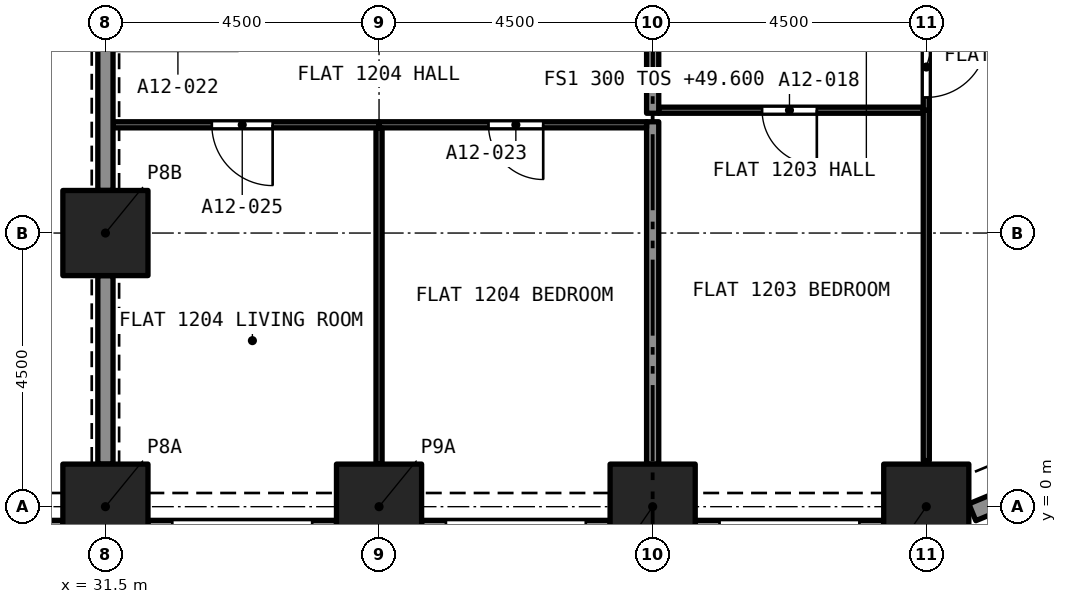
"""IFC4 building model, lengths in metres.
Left out: names, types, materials, properties, quantities, classifications, styles, units other than length and angle.
Written with IfcOpenShell. Run it as: python <this file> out.ifc"""

import sys

from ifc_helpers import new_model, si_unit, direction, frame, frame_2d, origin, origin_2d, place, context, subcontext, project, spatial, rectangle, extrude, element, fill, save


model = new_model("IFC4")
c1 = context("Model", 3, precision=1e-05, world=origin(), true_north=direction((0.0, 1.0)))
c2 = subcontext(c1, "Body", "Model", "MODEL_VIEW")
j1 = project(units=[si_unit("LENGTHUNIT", "METRE"), si_unit("PLANEANGLEUNIT", "RADIAN")], contexts=[c1])
p1 = place(None, origin())
s1 = spatial("IfcSite", under=j1, at=p1, CompositionType="ELEMENT")
p2 = place(p1, origin())
s2 = spatial("IfcBuilding", under=s1, at=p2, CompositionType="ELEMENT")
p3 = place(p2, frame((0.0, 0.0, 49.6)))
s3 = spatial("IfcBuildingStorey", under=s2, at=p3, CompositionType="ELEMENT", Elevation=49.6)
for number, where, z_axis, x_axis in (
    (1, (31.5, 0.0, 0.0), (0.0, 0.0, 1.0), (1.0, 0.0, 0.0)),
    (2, (36.0, 0.0, 0.0), (0.0, 0.0, 1.0), (1.0, 0.0, 0.0)),
    (3, (40.5, 0.0, 0.0), (0.0, 0.0, 1.0), (1.0, 0.0, 0.0)),
    (4, (45.0, 0.0, 0.0), (0.0, 0.0, 1.0), (1.0, 0.0, 0.0)),
    (5, (31.5, 4.5, 0.0), (0.0, 0.0, 1.0), (1.0, 0.0, 0.0)),
):
    element("IfcColumn", number, at=place(p3, frame(where, z_axis=z_axis, x_axis=x_axis)), inside=s3, PredefinedType="COLUMN", context=c2, shape_type="SweptSolid", body=[
        extrude(rectangle(XDim=1.4, YDim=1.4, at=origin_2d()), origin(), (0.0, 0.0, 1.0), 3.2),
    ])
p4 = place(p3, frame((30.8, -0.375, 0.0), z_axis=(0.0, 0.0, 1.0), x_axis=(-1.0, 0.0, 0.0)))
e6 = element("IfcWall", 6, at=p4, inside=s3, PredefinedType="SOLIDWALL", context=c2, shape_type="SweptSolid", body=[
    extrude(rectangle(XDim=3.1, YDim=0.3, at=frame_2d((1.55, 0.0))), origin(), (0.0, 0.0, 1.0), 3.2),
])
p5 = place(p4, frame((0.4, 0.0, 0.45)))
e7 = element("IfcOpeningElement", 7, at=p5, cuts=e6, PredefinedType="OPENING", context=c2, shape_type="SweptSolid", body=[
    extrude(rectangle(XDim=2.3, YDim=1.95, at=frame_2d((1.15, 0.975))), frame((0.0, 0.16, 0.0), z_axis=(0.0, -1.0, 0.0), x_axis=(1.0, 0.0, 0.0)), (0.0, 0.0, 1.0), 0.32),
])
p6 = place(p3, frame((35.3, -0.375, 0.0), z_axis=(0.0, 0.0, 1.0), x_axis=(-1.0, 0.0, 0.0)))
e8 = element("IfcWall", 8, at=p6, inside=s3, PredefinedType="SOLIDWALL", context=c2, shape_type="SweptSolid", body=[
    extrude(rectangle(XDim=3.1, YDim=0.3, at=frame_2d((1.55, 0.0))), origin(), (0.0, 0.0, 1.0), 3.2),
])
p7 = place(p6, frame((0.4, 0.0, 0.45)))
e9 = element("IfcOpeningElement", 9, at=p7, cuts=e8, PredefinedType="OPENING", context=c2, shape_type="SweptSolid", body=[
    extrude(rectangle(XDim=2.3, YDim=1.95, at=frame_2d((1.15, 0.975))), frame((0.0, 0.16, 0.0), z_axis=(0.0, -1.0, 0.0), x_axis=(1.0, 0.0, 0.0)), (0.0, 0.0, 1.0), 0.32),
])
p8 = place(p3, frame((39.8, -0.375, 0.0), z_axis=(0.0, 0.0, 1.0), x_axis=(-1.0, 0.0, 0.0)))
e10 = element("IfcWall", 10, at=p8, inside=s3, PredefinedType="SOLIDWALL", context=c2, shape_type="SweptSolid", body=[
    extrude(rectangle(XDim=3.1, YDim=0.3, at=frame_2d((1.55, 0.0))), origin(), (0.0, 0.0, 1.0), 3.2),
])
p9 = place(p8, frame((0.4, 0.0, 0.45)))
e11 = element("IfcOpeningElement", 11, at=p9, cuts=e10, PredefinedType="OPENING", context=c2, shape_type="SweptSolid", body=[
    extrude(rectangle(XDim=2.3, YDim=1.95, at=frame_2d((1.15, 0.975))), frame((0.0, 0.16, 0.0), z_axis=(0.0, -1.0, 0.0), x_axis=(1.0, 0.0, 0.0)), (0.0, 0.0, 1.0), 0.32),
])
p10 = place(p3, frame((44.3, -0.375, 0.0), z_axis=(0.0, 0.0, 1.0), x_axis=(-1.0, 0.0, 0.0)))
e12 = element("IfcWall", 12, at=p10, inside=s3, PredefinedType="SOLIDWALL", context=c2, shape_type="SweptSolid", body=[
    extrude(rectangle(XDim=3.1, YDim=0.3, at=frame_2d((1.55, 0.0))), origin(), (0.0, 0.0, 1.0), 3.2),
])
p11 = place(p10, frame((0.4, 0.0, 0.45)))
e13 = element("IfcOpeningElement", 13, at=p11, cuts=e12, PredefinedType="OPENING", context=c2, shape_type="SweptSolid", body=[
    extrude(rectangle(XDim=2.3, YDim=1.95, at=frame_2d((1.15, 0.975))), frame((0.0, 0.16, 0.0), z_axis=(0.0, -1.0, 0.0), x_axis=(1.0, 0.0, 0.0)), (0.0, 0.0, 1.0), 0.32),
])
p12 = place(p3, frame((47.48, 0.622, 0.0), z_axis=(0.0, 0.0, 1.0), x_axis=(-0.923903565336, -0.38262540684, 0.0)))
e14 = element("IfcWall", 14, at=p12, inside=s3, PredefinedType="SOLIDWALL", context=c2, shape_type="SweptSolid", body=[
    extrude(rectangle(XDim=1.865, YDim=0.3, at=frame_2d((0.933, 0.0))), origin(), (0.0, 0.0, 1.0), 3.2),
])
p13 = place(p12, frame((0.258, 0.0, 0.45)))
e15 = element("IfcOpeningElement", 15, at=p13, cuts=e14, PredefinedType="OPENING", context=c2, shape_type="SweptSolid", body=[
    extrude(rectangle(XDim=1.1, YDim=1.95, at=frame_2d((0.55, 0.975))), frame((0.0, 0.16, 0.0), z_axis=(0.0, -1.0, 0.0), x_axis=(1.0, 0.0, 0.0)), (0.0, 0.0, 1.0), 0.32),
])
p14 = place(p3, frame((44.95, 6.52, 0.0), z_axis=(0.0, 0.0, 1.0), x_axis=(-1.0, 0.0, 0.0)))
e16 = element("IfcWall", 16, at=p14, inside=s3, PredefinedType="PARTITIONING", context=c2, shape_type="SweptSolid", body=[
    extrude(rectangle(XDim=4.35, YDim=0.1, at=frame_2d((2.175, 0.0))), origin(), (0.0, 0.0, 1.0), 2.9),
])
p15 = place(p14, frame((1.75, 0.0, 0.0)))
e17 = element("IfcOpeningElement", 17, at=p15, cuts=e16, PredefinedType="OPENING", context=c2, shape_type="SweptSolid", body=[
    extrude(rectangle(XDim=0.9, YDim=2.1, at=frame_2d((0.45, 1.05))), frame((0.0, 0.06, 0.0), z_axis=(0.0, -1.0, 0.0), x_axis=(1.0, 0.0, 0.0)), (0.0, 0.0, 1.0), 0.12),
])
p16 = place(p3, frame((45.0, 0.758, 0.0), z_axis=(0.0, 0.0, 1.0), x_axis=(0.0, 1.0, 0.0)))
e18 = element("IfcWall", 18, at=p16, inside=s3, PredefinedType="PARTITIONING", context=c2, shape_type="SweptSolid", body=[
    extrude(rectangle(XDim=5.762, YDim=0.1, at=frame_2d((2.881, 0.0))), origin(), (0.0, 0.0, 1.0), 2.9),
])
p17 = place(p3, frame((40.5, 0.7, 0.0), z_axis=(0.0, 0.0, 1.0), x_axis=(0.0, 1.0, 0.0)))
e19 = element("IfcWall", 19, at=p17, inside=s3, PredefinedType="PARTITIONING", context=c2, shape_type="SweptSolid", body=[
    extrude(rectangle(XDim=5.63, YDim=0.2, at=frame_2d((2.815, 0.0))), origin(), (0.0, 0.0, 1.0), 2.9),
])
p18 = place(p3, frame((45.0, 14.125, 0.0), z_axis=(0.0, 0.0, 1.0), x_axis=(0.0, -1.0, 0.0)))
e20 = element("IfcWall", 20, at=p18, inside=s3, PredefinedType="PARTITIONING", context=c2, shape_type="SweptSolid", body=[
    extrude(rectangle(XDim=7.605, YDim=0.1, at=frame_2d((3.802, 0.0))), origin(), (0.0, 0.0, 1.0), 2.9),
])
p19 = place(p18, frame((6.395, 0.0, 0.0)))
e21 = element("IfcOpeningElement", 21, at=p19, cuts=e20, PredefinedType="OPENING", context=c2, shape_type="SweptSolid", body=[
    extrude(rectangle(XDim=1.0, YDim=2.1, at=frame_2d((0.5, 1.05))), frame((0.0, 0.06, 0.0), z_axis=(0.0, -1.0, 0.0), x_axis=(1.0, 0.0, 0.0)), (0.0, 0.0, 1.0), 0.12),
])
p20 = place(p3, frame((40.5, 6.47, 0.0), z_axis=(0.0, 0.0, 1.0), x_axis=(0.0, 1.0, 0.0)))
e22 = element("IfcWall", 22, at=p20, inside=s3, PredefinedType="PARTITIONING", context=c2, shape_type="SweptSolid", body=[
    extrude(rectangle(XDim=7.655, YDim=0.2, at=frame_2d((3.828, 0.0))), origin(), (0.0, 0.0, 1.0), 2.9),
])
p21 = place(p3, frame((40.4, 6.28, 0.0), z_axis=(0.0, 0.0, 1.0), x_axis=(-1.0, 0.0, 0.0)))
e23 = element("IfcWall", 23, at=p21, inside=s3, PredefinedType="PARTITIONING", context=c2, shape_type="SweptSolid", body=[
    extrude(rectangle(XDim=4.4, YDim=0.1, at=frame_2d((2.2, 0.0))), origin(), (0.0, 0.0, 1.0), 2.9),
])
p22 = place(p21, frame((1.7, 0.0, 0.0)))
e24 = element("IfcOpeningElement", 24, at=p22, cuts=e23, PredefinedType="OPENING", context=c2, shape_type="SweptSolid", body=[
    extrude(rectangle(XDim=0.9, YDim=2.1, at=frame_2d((0.45, 1.05))), frame((0.0, 0.06, 0.0), z_axis=(0.0, -1.0, 0.0), x_axis=(1.0, 0.0, 0.0)), (0.0, 0.0, 1.0), 0.12),
])
p23 = place(p3, frame((36.0, 0.7, 0.0), z_axis=(0.0, 0.0, 1.0), x_axis=(0.0, 1.0, 0.0)))
e25 = element("IfcWall", 25, at=p23, inside=s3, PredefinedType="PARTITIONING", context=c2, shape_type="SweptSolid", body=[
    extrude(rectangle(XDim=5.53, YDim=0.1, at=frame_2d((2.765, 0.0))), origin(), (0.0, 0.0, 1.0), 2.9),
])
p24 = place(p3, frame((36.0, 6.28, 0.0), z_axis=(0.0, 0.0, 1.0), x_axis=(-1.0, 0.0, 0.0)))
e26 = element("IfcWall", 26, at=p24, inside=s3, PredefinedType="PARTITIONING", context=c2, shape_type="SweptSolid", body=[
    extrude(rectangle(XDim=4.375, YDim=0.1, at=frame_2d((2.188, 0.0))), origin(), (0.0, 0.0, 1.0), 2.9),
])
p25 = place(p24, frame((1.75, 0.0, 0.0)))
e27 = element("IfcOpeningElement", 27, at=p25, cuts=e26, PredefinedType="OPENING", context=c2, shape_type="SweptSolid", body=[
    extrude(rectangle(XDim=1.0, YDim=2.1, at=frame_2d((0.5, 1.05))), frame((0.0, 0.06, 0.0), z_axis=(0.0, -1.0, 0.0), x_axis=(1.0, 0.0, 0.0)), (0.0, 0.0, 1.0), 0.12),
])
for number, where, z_axis, x_axis in (
    (28, (31.5, 0.7, 0.0), (0.0, 0.0, 1.0), (0.0, 1.0, 0.0)),
    (29, (31.5, 5.2, 0.0), (0.0, 0.0, 1.0), (0.0, 1.0, 0.0)),
):
    element("IfcWall", number, at=place(p3, frame(where, z_axis=z_axis, x_axis=x_axis)), inside=s3, PredefinedType="PARTITIONING", context=c2, shape_type="SweptSolid", body=[
        extrude(rectangle(XDim=3.1, YDim=0.25, at=frame_2d((1.55, 0.0))), origin(), (0.0, 0.0, 1.0), 2.38),
    ])
p26 = place(p15, origin())
e30 = element("IfcDoor", 30, at=p26, inside=s3, OperationType="SINGLE_SWING_RIGHT", PredefinedType="DOOR", context=c2, shape_type="SweptSolid", body=[
    extrude(rectangle(XDim=0.9, YDim=2.1, at=frame_2d((0.45, 1.05))), frame((0.0, 0.025, 0.0), z_axis=(0.0, -1.0, 0.0), x_axis=(1.0, 0.0, 0.0)), (0.0, 0.0, 1.0), 0.05),
])
fill(e17, e30)
p27 = place(p19, origin())
e31 = element("IfcDoor", 31, at=p27, inside=s3, OperationType="SINGLE_SWING_RIGHT", PredefinedType="DOOR", context=c2, shape_type="SweptSolid", body=[
    extrude(rectangle(XDim=1.0, YDim=2.1, at=frame_2d((0.5, 1.05))), frame((0.0, 0.025, 0.0), z_axis=(0.0, -1.0, 0.0), x_axis=(1.0, 0.0, 0.0)), (0.0, 0.0, 1.0), 0.05),
])
fill(e21, e31)
p28 = place(p22, origin())
e32 = element("IfcDoor", 32, at=p28, inside=s3, OperationType="SINGLE_SWING_LEFT", PredefinedType="DOOR", context=c2, shape_type="SweptSolid", body=[
    extrude(rectangle(XDim=0.9, YDim=2.1, at=frame_2d((0.45, 1.05))), frame((0.0, 0.025, 0.0), z_axis=(0.0, -1.0, 0.0), x_axis=(1.0, 0.0, 0.0)), (0.0, 0.0, 1.0), 0.05),
])
fill(e24, e32)
p29 = place(p25, origin())
e33 = element("IfcDoor", 33, at=p29, inside=s3, OperationType="SINGLE_SWING_RIGHT", PredefinedType="DOOR", context=c2, shape_type="SweptSolid", body=[
    extrude(rectangle(XDim=1.0, YDim=2.1, at=frame_2d((0.5, 1.05))), frame((0.0, 0.025, 0.0), z_axis=(0.0, -1.0, 0.0), x_axis=(1.0, 0.0, 0.0)), (0.0, 0.0, 1.0), 0.05),
])
fill(e27, e33)
save(model, sys.argv[1])
